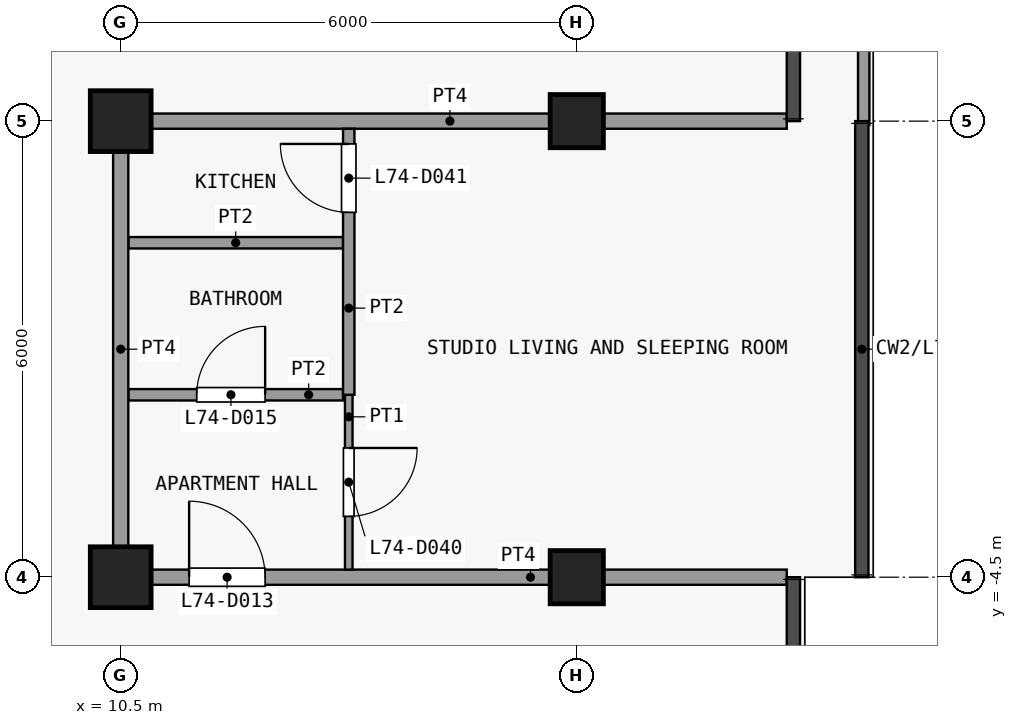
"""IFC4 building model, lengths in metres.
Left out: names, types, materials, properties, quantities, classifications, styles, units other than length and angle.
Written with IfcOpenShell. Run it as: python <this file> out.ifc"""

import sys

from ifc_helpers import new_model, si_unit, direction, frame, frame_2d, origin, origin_2d, place, context, subcontext, project, spatial, rectangle, extrude, element, fill, save


model = new_model("IFC4")
c1 = context("Model", 3, precision=1e-05, world=origin(), true_north=direction((0.0, 1.0)))
c2 = subcontext(c1, "Body", "Model", "MODEL_VIEW")
j1 = project(units=[si_unit("LENGTHUNIT", "METRE"), si_unit("PLANEANGLEUNIT", "RADIAN")], contexts=[c1])
p1 = place(None, origin())
s1 = spatial("IfcSite", under=j1, at=p1, CompositionType="ELEMENT")
p2 = place(p1, origin())
s2 = spatial("IfcBuilding", under=s1, at=p2, CompositionType="ELEMENT")
p3 = place(p2, frame((0.0, 0.0, 291.5)))
s3 = spatial("IfcBuildingStorey", under=s2, at=p3, CompositionType="ELEMENT", Elevation=291.5)
for number, where, z_axis, x_axis in (
    (1, (10.5, -4.5, 0.0), (0.0, 0.0, 1.0), (1.0, 0.0, 0.0)),
    (2, (10.5, 1.5, 0.0), (0.0, 0.0, 1.0), (1.0, 0.0, 0.0)),
):
    element("IfcColumn", number, at=place(p3, frame(where, z_axis=z_axis, x_axis=x_axis)), inside=s3, PredefinedType="COLUMN", context=c2, shape_type="SweptSolid", body=[
        extrude(rectangle(XDim=0.8, YDim=0.8, at=origin_2d()), origin(), (0.0, 0.0, 1.0), 3.6),
    ])
for number, where, z_axis, x_axis in (
    (3, (16.5, -4.5, 0.0), (0.0, 0.0, 1.0), (1.0, 0.0, 0.0)),
    (4, (16.5, 1.5, 0.0), (0.0, 0.0, 1.0), (1.0, 0.0, 0.0)),
):
    element("IfcColumn", number, at=place(p3, frame(where, z_axis=z_axis, x_axis=x_axis)), inside=s3, PredefinedType="COLUMN", context=c2, shape_type="SweptSolid", body=[
        extrude(rectangle(XDim=0.7, YDim=0.7, at=origin_2d()), origin(), (0.0, 0.0, 1.0), 3.6),
    ])
p4 = place(p3, frame((20.275, 7.3, 0.0), z_axis=(0.0, 0.0, 1.0), x_axis=(0.0, -1.0, 0.0)))
e5 = element("IfcWall", 5, at=p4, inside=s3, PredefinedType="PARAPET", context=c2, shape_type="SweptSolid", body=[
    extrude(rectangle(XDim=5.853, YDim=0.15, at=frame_2d((2.926, 0.0))), origin(), (0.0, 0.0, 1.0), 1.15),
])
p5 = place(p3, frame((10.4, -4.5, 0.0), z_axis=(0.0, 0.0, 1.0), x_axis=(1.0, 0.0, 0.0)))
e6 = element("IfcWall", 6, at=p5, inside=s3, PredefinedType="PARTITIONING", context=c2, shape_type="SweptSolid", body=[
    extrude(rectangle(XDim=8.863, YDim=0.2, at=frame_2d((4.431, 0.0))), origin(), (0.0, 0.0, 1.0), 3.3),
])
p6 = place(p5, frame((1.0, 0.0, 0.0)))
e7 = element("IfcOpeningElement", 7, at=p6, cuts=e6, PredefinedType="OPENING", context=c2, shape_type="SweptSolid", body=[
    extrude(rectangle(XDim=1.0, YDim=2.1, at=frame_2d((0.5, 1.05))), frame((0.0, 0.11, 0.0), z_axis=(0.0, -1.0, 0.0), x_axis=(1.0, 0.0, 0.0)), (0.0, 0.0, 1.0), 0.22),
])
p7 = place(p3, frame((10.6, -2.1, 0.0), z_axis=(0.0, 0.0, 1.0), x_axis=(1.0, 0.0, 0.0)))
e8 = element("IfcWall", 8, at=p7, inside=s3, PredefinedType="PARTITIONING", context=c2, shape_type="SweptSolid", body=[
    extrude(rectangle(XDim=2.825, YDim=0.15, at=frame_2d((1.413, 0.0))), origin(), (0.0, 0.0, 1.0), 3.3),
])
p8 = place(p7, frame((0.9, 0.0, 0.0)))
e9 = element("IfcOpeningElement", 9, at=p8, cuts=e8, PredefinedType="OPENING", context=c2, shape_type="SweptSolid", body=[
    extrude(rectangle(XDim=0.9, YDim=2.1, at=frame_2d((0.45, 1.05))), frame((0.0, 0.085, 0.0), z_axis=(0.0, -1.0, 0.0), x_axis=(1.0, 0.0, 0.0)), (0.0, 0.0, 1.0), 0.17),
])
p9 = place(p3, frame((10.6, -0.1, 0.0), z_axis=(0.0, 0.0, 1.0), x_axis=(1.0, 0.0, 0.0)))
e10 = element("IfcWall", 10, at=p9, inside=s3, PredefinedType="PARTITIONING", context=c2, shape_type="SweptSolid", body=[
    extrude(rectangle(XDim=2.825, YDim=0.15, at=frame_2d((1.413, 0.0))), origin(), (0.0, 0.0, 1.0), 3.3),
])
p10 = place(p3, frame((10.4, 1.5, 0.0), z_axis=(0.0, 0.0, 1.0), x_axis=(1.0, 0.0, 0.0)))
e11 = element("IfcWall", 11, at=p10, inside=s3, PredefinedType="PARTITIONING", context=c2, shape_type="SweptSolid", body=[
    extrude(rectangle(XDim=8.863, YDim=0.2, at=frame_2d((4.431, 0.0))), origin(), (0.0, 0.0, 1.0), 3.3),
])
p11 = place(p3, frame((10.5, -4.4, 0.0), z_axis=(0.0, 0.0, 1.0), x_axis=(0.0, 1.0, 0.0)))
e12 = element("IfcWall", 12, at=p11, inside=s3, PredefinedType="PARTITIONING", context=c2, shape_type="SweptSolid", body=[
    extrude(rectangle(XDim=5.8, YDim=0.2, at=frame_2d((2.9, 0.0))), origin(), (0.0, 0.0, 1.0), 3.3),
])
p12 = place(p3, frame((13.5, -4.4, 0.0), z_axis=(0.0, 0.0, 1.0), x_axis=(0.0, 1.0, 0.0)))
e13 = element("IfcWall", 13, at=p12, inside=s3, PredefinedType="PARTITIONING", context=c2, shape_type="SweptSolid", body=[
    extrude(rectangle(XDim=2.3, YDim=0.1, at=frame_2d((1.15, 0.0))), origin(), (0.0, 0.0, 1.0), 3.3),
])
p13 = place(p12, frame((0.7, 0.0, 0.0)))
e14 = element("IfcOpeningElement", 14, at=p13, cuts=e13, PredefinedType="OPENING", context=c2, shape_type="SweptSolid", body=[
    extrude(rectangle(XDim=0.9, YDim=2.1, at=frame_2d((0.45, 1.05))), frame((0.0, 0.06, 0.0), z_axis=(0.0, -1.0, 0.0), x_axis=(1.0, 0.0, 0.0)), (0.0, 0.0, 1.0), 0.12),
])
p14 = place(p3, frame((13.5, -2.1, 0.0), z_axis=(0.0, 0.0, 1.0), x_axis=(0.0, 1.0, 0.0)))
e15 = element("IfcWall", 15, at=p14, inside=s3, PredefinedType="PARTITIONING", context=c2, shape_type="SweptSolid", body=[
    extrude(rectangle(XDim=3.5, YDim=0.15, at=frame_2d((1.75, 0.0))), origin(), (0.0, 0.0, 1.0), 3.3),
])
p15 = place(p14, frame((2.4, 0.0, 0.0)))
e16 = element("IfcOpeningElement", 16, at=p15, cuts=e15, PredefinedType="OPENING", context=c2, shape_type="SweptSolid", body=[
    extrude(rectangle(XDim=0.9, YDim=2.1, at=frame_2d((0.45, 1.05))), frame((0.0, 0.085, 0.0), z_axis=(0.0, -1.0, 0.0), x_axis=(1.0, 0.0, 0.0)), (0.0, 0.0, 1.0), 0.17),
])
p16 = place(p6, origin())
e17 = element("IfcDoor", 17, at=p16, inside=s3, OperationType="SINGLE_SWING_RIGHT", PredefinedType="DOOR", context=c2, shape_type="SweptSolid", body=[
    extrude(rectangle(XDim=1.0, YDim=2.1, at=frame_2d((0.5, 1.05))), frame((0.0, 0.025, 0.0), z_axis=(0.0, -1.0, 0.0), x_axis=(1.0, 0.0, 0.0)), (0.0, 0.0, 1.0), 0.05),
])
fill(e7, e17)
p17 = place(p8, origin())
e18 = element("IfcDoor", 18, at=p17, inside=s3, OperationType="SINGLE_SWING_LEFT", PredefinedType="DOOR", context=c2, shape_type="SweptSolid", body=[
    extrude(rectangle(XDim=0.9, YDim=2.1, at=frame_2d((0.45, 1.05))), frame((0.0, 0.025, 0.0), z_axis=(0.0, -1.0, 0.0), x_axis=(1.0, 0.0, 0.0)), (0.0, 0.0, 1.0), 0.05),
])
fill(e9, e18)
p18 = place(p13, origin())
e19 = element("IfcDoor", 19, at=p18, inside=s3, OperationType="SINGLE_SWING_RIGHT", PredefinedType="DOOR", context=c2, shape_type="SweptSolid", body=[
    extrude(rectangle(XDim=0.9, YDim=2.1, at=frame_2d((0.45, 1.05))), frame((0.0, 0.025, 0.0), z_axis=(0.0, -1.0, 0.0), x_axis=(1.0, 0.0, 0.0)), (0.0, 0.0, 1.0), 0.05),
])
fill(e14, e19)
p19 = place(p15, origin())
e20 = element("IfcDoor", 20, at=p19, inside=s3, OperationType="SINGLE_SWING_LEFT", PredefinedType="DOOR", context=c2, shape_type="SweptSolid", body=[
    extrude(rectangle(XDim=0.9, YDim=2.1, at=frame_2d((0.45, 1.05))), frame((0.0, 0.025, 0.0), z_axis=(0.0, -1.0, 0.0), x_axis=(1.0, 0.0, 0.0)), (0.0, 0.0, 1.0), 0.05),
])
fill(e16, e20)
save(model, sys.argv[1])
